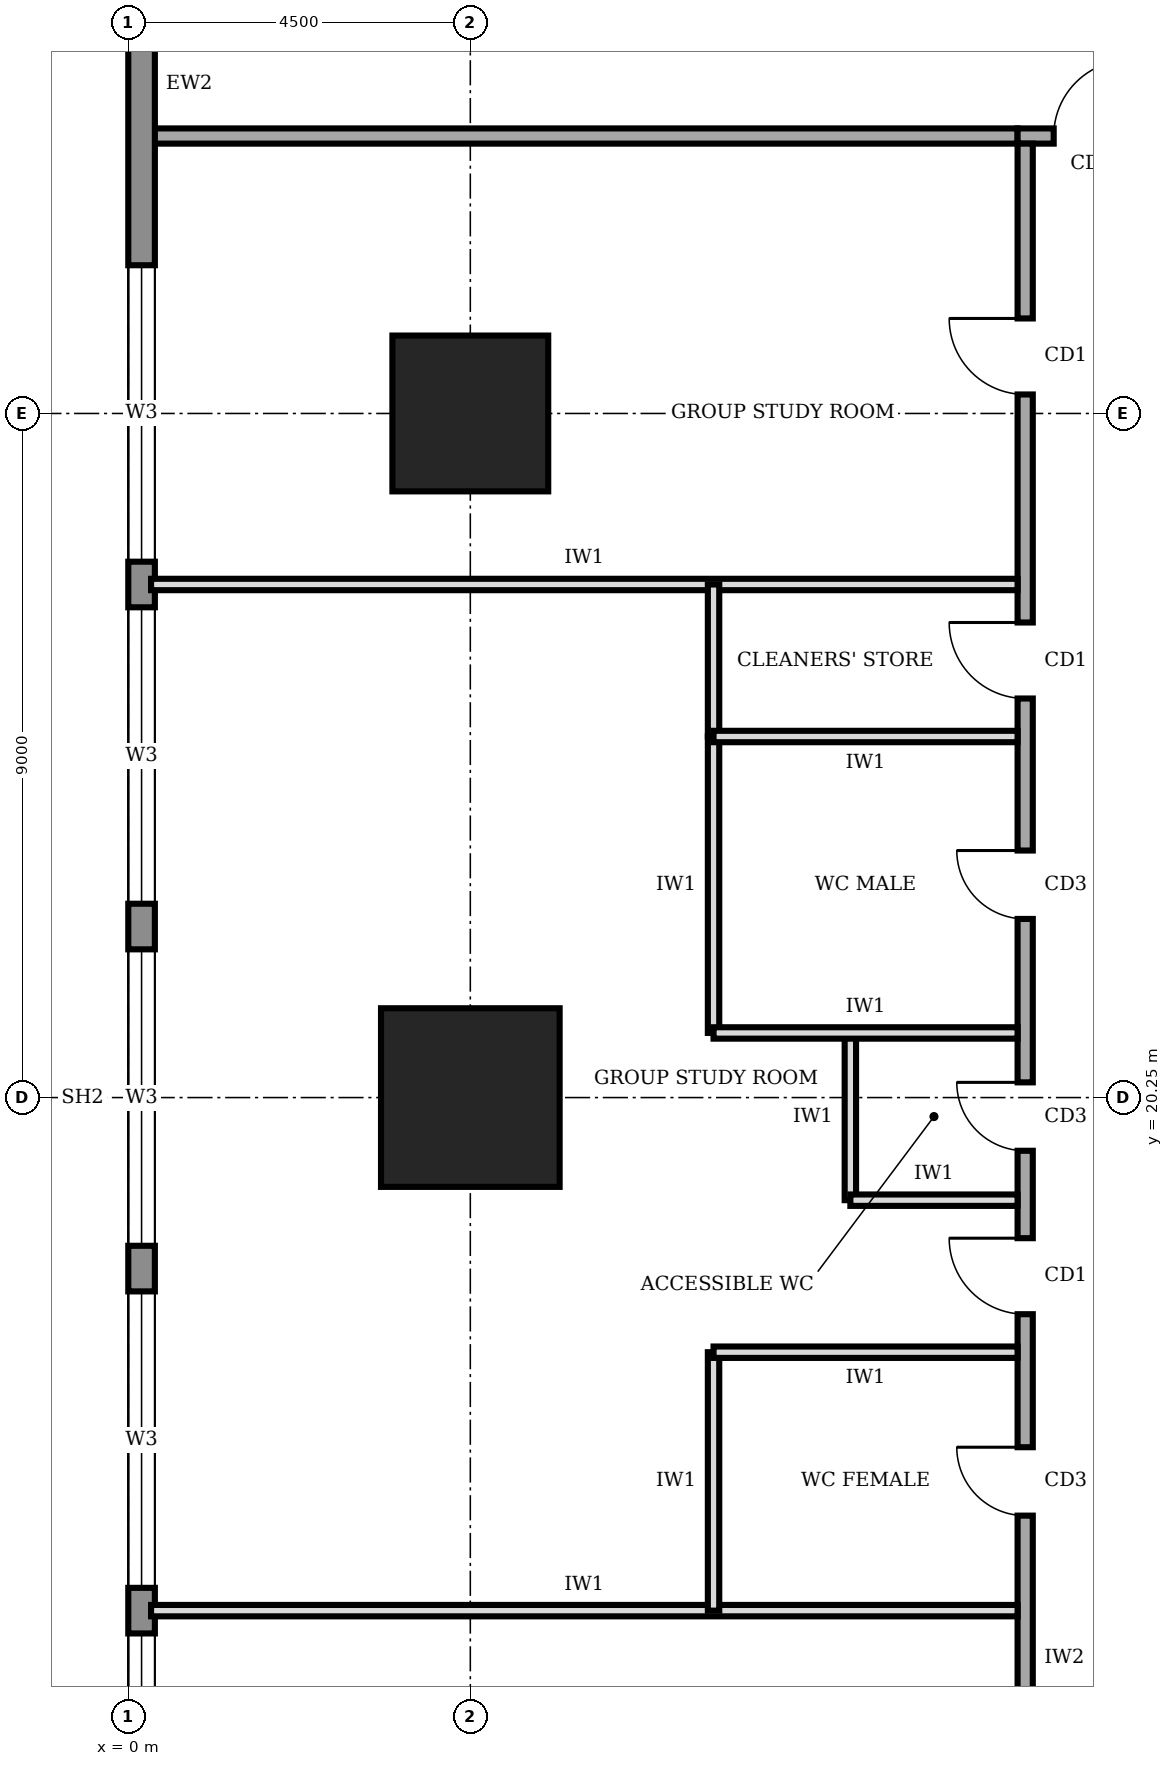
"""IFC4 building model, lengths in metres.
Left out: names, types, materials, properties, quantities, classifications, styles, units other than length and angle.
Written with IfcOpenShell. Run it as: python <this file> out.ifc"""

import sys

from ifc_helpers import new_model, si_unit, direction, frame, frame_2d, origin, origin_2d, place, context, subcontext, project, spatial, rectangle, extrude, element, fill, save


model = new_model("IFC4")
c1 = context("Model", 3, precision=1e-05, world=origin(), true_north=direction((0.0, 1.0)))
c2 = subcontext(c1, "Body", "Model", "MODEL_VIEW")
j1 = project(units=[si_unit("LENGTHUNIT", "METRE"), si_unit("PLANEANGLEUNIT", "RADIAN")], contexts=[c1])
p1 = place(None, origin())
s1 = spatial("IfcSite", under=j1, at=p1, CompositionType="ELEMENT")
p2 = place(p1, origin())
s2 = spatial("IfcBuilding", under=s1, at=p2, CompositionType="ELEMENT")
p3 = place(p2, frame((0.0, 0.0, 189.0)))
s3 = spatial("IfcBuildingStorey", under=s2, at=p3, CompositionType="ELEMENT", Elevation=189.0)
p4 = place(p3, frame((4.5, 20.25, 0.0), z_axis=(0.0, 0.0, 1.0), x_axis=(1.0, 0.0, 0.0)))
e1 = element("IfcColumn", 1, at=p4, inside=s3, PredefinedType="COLUMN", context=c2, shape_type="SweptSolid", body=[
    extrude(rectangle(XDim=2.35, YDim=2.35, at=origin_2d()), origin(), (0.0, 0.0, 1.0), 4.0),
])
p5 = place(p3, frame((4.5, 29.25, 0.0), z_axis=(0.0, 0.0, 1.0), x_axis=(1.0, 0.0, 0.0)))
e2 = element("IfcColumn", 2, at=p5, inside=s3, PredefinedType="COLUMN", context=c2, shape_type="SweptSolid", body=[
    extrude(rectangle(XDim=2.05, YDim=2.05, at=origin_2d()), origin(), (0.0, 0.0, 1.0), 4.0),
])
p6 = place(p3, frame((0.175, 35.98, 0.0), z_axis=(0.0, 0.0, 1.0), x_axis=(0.0, -1.0, 0.0)))
e3 = element("IfcWall", 3, at=p6, inside=s3, PredefinedType="STANDARD", context=c2, shape_type="SweptSolid", body=[
    extrude(rectangle(XDim=31.46, YDim=0.35, at=frame_2d((15.73, 0.0))), origin(), (0.0, 0.0, 1.0), 3.75),
])
p7 = place(p6, frame((27.21, 0.0, 0.95)))
e4 = element("IfcOpeningElement", 4, at=p7, cuts=e3, PredefinedType="OPENING", context=c2, shape_type="SweptSolid", body=[
    extrude(rectangle(XDim=3.9, YDim=1.8, at=frame_2d((1.95, 0.9))), frame((0.0, 0.185, 0.0), z_axis=(0.0, -1.0, 0.0), x_axis=(1.0, 0.0, 0.0)), (0.0, 0.0, 1.0), 0.37),
])
p8 = place(p6, frame((22.78, 0.0, 0.95)))
e5 = element("IfcOpeningElement", 5, at=p8, cuts=e3, PredefinedType="OPENING", context=c2, shape_type="SweptSolid", body=[
    extrude(rectangle(XDim=3.9, YDim=1.8, at=frame_2d((1.95, 0.9))), frame((0.0, 0.185, 0.0), z_axis=(0.0, -1.0, 0.0), x_axis=(1.0, 0.0, 0.0)), (0.0, 0.0, 1.0), 0.37),
])
p9 = place(p6, frame((18.28, 0.0, 0.95)))
e6 = element("IfcOpeningElement", 6, at=p9, cuts=e3, PredefinedType="OPENING", context=c2, shape_type="SweptSolid", body=[
    extrude(rectangle(XDim=3.9, YDim=1.8, at=frame_2d((1.95, 0.9))), frame((0.0, 0.185, 0.0), z_axis=(0.0, -1.0, 0.0), x_axis=(1.0, 0.0, 0.0)), (0.0, 0.0, 1.0), 0.37),
])
p10 = place(p6, frame((13.78, 0.0, 0.95)))
e7 = element("IfcOpeningElement", 7, at=p10, cuts=e3, PredefinedType="OPENING", context=c2, shape_type="SweptSolid", body=[
    extrude(rectangle(XDim=3.9, YDim=1.8, at=frame_2d((1.95, 0.9))), frame((0.0, 0.185, 0.0), z_axis=(0.0, -1.0, 0.0), x_axis=(1.0, 0.0, 0.0)), (0.0, 0.0, 1.0), 0.37),
])
p11 = place(p6, frame((9.28, 0.0, 0.95)))
e8 = element("IfcOpeningElement", 8, at=p11, cuts=e3, PredefinedType="OPENING", context=c2, shape_type="SweptSolid", body=[
    extrude(rectangle(XDim=3.9, YDim=1.8, at=frame_2d((1.95, 0.9))), frame((0.0, 0.185, 0.0), z_axis=(0.0, -1.0, 0.0), x_axis=(1.0, 0.0, 0.0)), (0.0, 0.0, 1.0), 0.37),
])
p12 = place(p6, frame((4.78, 0.0, 0.95)))
e9 = element("IfcOpeningElement", 9, at=p12, cuts=e3, PredefinedType="OPENING", context=c2, shape_type="SweptSolid", body=[
    extrude(rectangle(XDim=3.9, YDim=1.8, at=frame_2d((1.95, 0.9))), frame((0.0, 0.185, 0.0), z_axis=(0.0, -1.0, 0.0), x_axis=(1.0, 0.0, 0.0)), (0.0, 0.0, 1.0), 0.37),
])
p13 = place(p3, frame((28.6, 32.9, 0.0), z_axis=(0.0, 0.0, 1.0), x_axis=(-1.0, 0.0, 0.0)))
e10 = element("IfcWall", 10, at=p13, inside=s3, PredefinedType="SOLIDWALL", context=c2, shape_type="SweptSolid", body=[
    extrude(rectangle(XDim=16.9, YDim=0.2, at=frame_2d((8.45, 0.0))), origin(), (0.0, 0.0, 1.0), 3.75),
])
p14 = place(p13, frame((15.425, 0.0, 0.0)))
e11 = element("IfcOpeningElement", 11, at=p14, cuts=e10, PredefinedType="OPENING", context=c2, shape_type="SweptSolid", body=[
    extrude(rectangle(XDim=1.0, YDim=2.1, at=frame_2d((0.5, 1.05))), frame((0.0, 0.11, 0.0), z_axis=(0.0, -1.0, 0.0), x_axis=(1.0, 0.0, 0.0)), (0.0, 0.0, 1.0), 0.22),
])
p15 = place(p13, frame((12.35, 0.0, 0.0)))
e12 = element("IfcOpeningElement", 12, at=p15, cuts=e10, PredefinedType="OPENING", context=c2, shape_type="SweptSolid", body=[
    extrude(rectangle(XDim=1.0, YDim=2.1, at=frame_2d((0.5, 1.05))), frame((0.0, 0.11, 0.0), z_axis=(0.0, -1.0, 0.0), x_axis=(1.0, 0.0, 0.0)), (0.0, 0.0, 1.0), 0.22),
])
p16 = place(p13, frame((5.6, 0.0, 0.0)))
e13 = element("IfcOpeningElement", 13, at=p16, cuts=e10, PredefinedType="OPENING", context=c2, shape_type="SweptSolid", body=[
    extrude(rectangle(XDim=1.0, YDim=2.1, at=frame_2d((0.5, 1.05))), frame((0.0, 0.11, 0.0), z_axis=(0.0, -1.0, 0.0), x_axis=(1.0, 0.0, 0.0)), (0.0, 0.0, 1.0), 0.22),
])
p17 = place(p13, frame((0.275, 0.0, 0.0)))
e14 = element("IfcOpeningElement", 14, at=p17, cuts=e10, PredefinedType="OPENING", context=c2, shape_type="SweptSolid", body=[
    extrude(rectangle(XDim=1.0, YDim=2.1, at=frame_2d((0.5, 1.05))), frame((0.0, 0.11, 0.0), z_axis=(0.0, -1.0, 0.0), x_axis=(1.0, 0.0, 0.0)), (0.0, 0.0, 1.0), 0.22),
])
p18 = place(p3, frame((11.8, 32.8, 0.0), z_axis=(0.0, 0.0, 1.0), x_axis=(0.0, -1.0, 0.0)))
e15 = element("IfcWall", 15, at=p18, inside=s3, PredefinedType="SOLIDWALL", context=c2, shape_type="SweptSolid", body=[
    extrude(rectangle(XDim=25.3, YDim=0.2, at=frame_2d((12.65, 0.0))), origin(), (0.0, 0.0, 1.0), 3.75),
])
p19 = place(p18, frame((21.8, 0.0, 0.0)))
e16 = element("IfcOpeningElement", 16, at=p19, cuts=e15, PredefinedType="OPENING", context=c2, shape_type="SweptSolid", body=[
    extrude(rectangle(XDim=1.0, YDim=2.1, at=frame_2d((0.5, 1.05))), frame((0.0, 0.11, 0.0), z_axis=(0.0, -1.0, 0.0), x_axis=(1.0, 0.0, 0.0)), (0.0, 0.0, 1.0), 0.22),
])
p20 = place(p18, frame((17.15, 0.0, 0.0)))
e17 = element("IfcOpeningElement", 17, at=p20, cuts=e15, PredefinedType="OPENING", context=c2, shape_type="SweptSolid", body=[
    extrude(rectangle(XDim=0.9, YDim=2.1, at=frame_2d((0.45, 1.05))), frame((0.0, 0.11, 0.0), z_axis=(0.0, -1.0, 0.0), x_axis=(1.0, 0.0, 0.0)), (0.0, 0.0, 1.0), 0.22),
])
p21 = place(p18, frame((12.35, 0.0, 0.0)))
e18 = element("IfcOpeningElement", 18, at=p21, cuts=e15, PredefinedType="OPENING", context=c2, shape_type="SweptSolid", body=[
    extrude(rectangle(XDim=0.9, YDim=2.1, at=frame_2d((0.45, 1.05))), frame((0.0, 0.11, 0.0), z_axis=(0.0, -1.0, 0.0), x_axis=(1.0, 0.0, 0.0)), (0.0, 0.0, 1.0), 0.22),
])
p22 = place(p18, frame((9.3, 0.0, 0.0)))
e19 = element("IfcOpeningElement", 19, at=p22, cuts=e15, PredefinedType="OPENING", context=c2, shape_type="SweptSolid", body=[
    extrude(rectangle(XDim=0.9, YDim=2.1, at=frame_2d((0.45, 1.05))), frame((0.0, 0.11, 0.0), z_axis=(0.0, -1.0, 0.0), x_axis=(1.0, 0.0, 0.0)), (0.0, 0.0, 1.0), 0.22),
])
p23 = place(p18, frame((6.3, 0.0, 0.0)))
e20 = element("IfcOpeningElement", 20, at=p23, cuts=e15, PredefinedType="OPENING", context=c2, shape_type="SweptSolid", body=[
    extrude(rectangle(XDim=1.0, YDim=2.1, at=frame_2d((0.5, 1.05))), frame((0.0, 0.11, 0.0), z_axis=(0.0, -1.0, 0.0), x_axis=(1.0, 0.0, 0.0)), (0.0, 0.0, 1.0), 0.22),
])
p24 = place(p18, frame((14.4, 0.0, 0.0)))
e21 = element("IfcOpeningElement", 21, at=p24, cuts=e15, PredefinedType="OPENING", context=c2, shape_type="SweptSolid", body=[
    extrude(rectangle(XDim=1.0, YDim=2.1, at=frame_2d((0.5, 1.05))), frame((0.0, 0.11, 0.0), z_axis=(0.0, -1.0, 0.0), x_axis=(1.0, 0.0, 0.0)), (0.0, 0.0, 1.0), 0.22),
])
p25 = place(p18, frame((2.3, 0.0, 0.0)))
e22 = element("IfcOpeningElement", 22, at=p25, cuts=e15, PredefinedType="OPENING", context=c2, shape_type="SweptSolid", body=[
    extrude(rectangle(XDim=1.0, YDim=2.1, at=frame_2d((0.5, 1.05))), frame((0.0, 0.11, 0.0), z_axis=(0.0, -1.0, 0.0), x_axis=(1.0, 0.0, 0.0)), (0.0, 0.0, 1.0), 0.22),
])
p26 = place(p3, frame((0.3, 32.9, 0.0), z_axis=(0.0, 0.0, 1.0), x_axis=(1.0, 0.0, 0.0)))
e23 = element("IfcWall", 23, at=p26, inside=s3, PredefinedType="SOLIDWALL", context=c2, shape_type="SweptSolid", body=[
    extrude(rectangle(XDim=11.4, YDim=0.2, at=frame_2d((5.7, 0.0))), origin(), (0.0, 0.0, 1.0), 3.75),
])
for number, where, z_axis, x_axis in (
    (24, (0.3, 13.5, 0.0), (0.0, 0.0, 1.0), (1.0, 0.0, 0.0)),
    (25, (0.3, 27.0, 0.0), (0.0, 0.0, 1.0), (1.0, 0.0, 0.0)),
):
    element("IfcWall", number, at=place(p3, frame(where, z_axis=z_axis, x_axis=x_axis)), inside=s3, PredefinedType="PARTITIONING", context=c2, shape_type="SweptSolid", body=[
        extrude(rectangle(XDim=11.4, YDim=0.15, at=frame_2d((5.7, 0.0))), origin(), (0.0, 0.0, 1.0), 3.75),
    ])
p27 = place(p3, frame((11.7, 16.9, 0.0), z_axis=(0.0, 0.0, 1.0), x_axis=(-1.0, 0.0, 0.0)))
e26 = element("IfcWall", 26, at=p27, inside=s3, PredefinedType="PARTITIONING", context=c2, shape_type="SweptSolid", body=[
    extrude(rectangle(XDim=4.0, YDim=0.15, at=frame_2d((2.0, 0.0))), origin(), (0.0, 0.0, 1.0), 3.75),
])
p28 = place(p3, frame((11.7, 18.9, 0.0), z_axis=(0.0, 0.0, 1.0), x_axis=(-1.0, 0.0, 0.0)))
e27 = element("IfcWall", 27, at=p28, inside=s3, PredefinedType="PARTITIONING", context=c2, shape_type="SweptSolid", body=[
    extrude(rectangle(XDim=2.2, YDim=0.15, at=frame_2d((1.1, 0.0))), origin(), (0.0, 0.0, 1.0), 3.75),
])
p29 = place(p3, frame((11.7, 21.1, 0.0), z_axis=(0.0, 0.0, 1.0), x_axis=(-1.0, 0.0, 0.0)))
e28 = element("IfcWall", 28, at=p29, inside=s3, PredefinedType="PARTITIONING", context=c2, shape_type="SweptSolid", body=[
    extrude(rectangle(XDim=4.0, YDim=0.15, at=frame_2d((2.0, 0.0))), origin(), (0.0, 0.0, 1.0), 2.85),
])
p30 = place(p3, frame((11.7, 25.0, 0.0), z_axis=(0.0, 0.0, 1.0), x_axis=(-1.0, 0.0, 0.0)))
e29 = element("IfcWall", 29, at=p30, inside=s3, PredefinedType="PARTITIONING", context=c2, shape_type="SweptSolid", body=[
    extrude(rectangle(XDim=4.0, YDim=0.15, at=frame_2d((2.0, 0.0))), origin(), (0.0, 0.0, 1.0), 3.75),
])
p31 = place(p3, frame((7.7, 13.5, 0.0), z_axis=(0.0, 0.0, 1.0), x_axis=(0.0, 1.0, 0.0)))
e30 = element("IfcWall", 30, at=p31, inside=s3, PredefinedType="PARTITIONING", context=c2, shape_type="SweptSolid", body=[
    extrude(rectangle(XDim=3.4, YDim=0.15, at=frame_2d((1.7, 0.0))), origin(), (0.0, 0.0, 1.0), 3.75),
])
p32 = place(p3, frame((9.5, 18.9, 0.0), z_axis=(0.0, 0.0, 1.0), x_axis=(0.0, 1.0, 0.0)))
e31 = element("IfcWall", 31, at=p32, inside=s3, PredefinedType="PARTITIONING", context=c2, shape_type="SweptSolid", body=[
    extrude(rectangle(XDim=2.2, YDim=0.15, at=frame_2d((1.1, 0.0))), origin(), (0.0, 0.0, 1.0), 3.75),
])
p33 = place(p3, frame((7.7, 21.1, 0.0), z_axis=(0.0, 0.0, 1.0), x_axis=(0.0, 1.0, 0.0)))
e32 = element("IfcWall", 32, at=p33, inside=s3, PredefinedType="PARTITIONING", context=c2, shape_type="SweptSolid", body=[
    extrude(rectangle(XDim=3.9, YDim=0.15, at=frame_2d((1.95, 0.0))), origin(), (0.0, 0.0, 1.0), 3.75),
])
p34 = place(p3, frame((7.7, 25.0, 0.0), z_axis=(0.0, 0.0, 1.0), x_axis=(0.0, 1.0, 0.0)))
e33 = element("IfcWall", 33, at=p34, inside=s3, PredefinedType="PARTITIONING", context=c2, shape_type="SweptSolid", body=[
    extrude(rectangle(XDim=2.0, YDim=0.15, at=frame_2d((1.0, 0.0))), origin(), (0.0, 0.0, 1.0), 3.75),
])
p35 = place(p8, origin())
e34 = element("IfcWindow", 34, at=p35, inside=s3, PartitioningType="SINGLE_PANEL", PredefinedType="WINDOW", context=c2, shape_type="SweptSolid", body=[
    extrude(rectangle(XDim=3.9, YDim=1.8, at=frame_2d((1.95, 0.9))), frame((0.0, 0.03, 0.0), z_axis=(0.0, -1.0, 0.0), x_axis=(1.0, 0.0, 0.0)), (0.0, 0.0, 1.0), 0.06),
])
fill(e5, e34)
p36 = place(p9, origin())
e35 = element("IfcWindow", 35, at=p36, inside=s3, PartitioningType="SINGLE_PANEL", PredefinedType="WINDOW", context=c2, shape_type="SweptSolid", body=[
    extrude(rectangle(XDim=3.9, YDim=1.8, at=frame_2d((1.95, 0.9))), frame((0.0, 0.03, 0.0), z_axis=(0.0, -1.0, 0.0), x_axis=(1.0, 0.0, 0.0)), (0.0, 0.0, 1.0), 0.06),
])
fill(e6, e35)
p37 = place(p10, origin())
e36 = element("IfcWindow", 36, at=p37, inside=s3, PartitioningType="SINGLE_PANEL", PredefinedType="WINDOW", context=c2, shape_type="SweptSolid", body=[
    extrude(rectangle(XDim=3.9, YDim=1.8, at=frame_2d((1.95, 0.9))), frame((0.0, 0.03, 0.0), z_axis=(0.0, -1.0, 0.0), x_axis=(1.0, 0.0, 0.0)), (0.0, 0.0, 1.0), 0.06),
])
fill(e7, e36)
p38 = place(p11, origin())
e37 = element("IfcWindow", 37, at=p38, inside=s3, PartitioningType="SINGLE_PANEL", PredefinedType="WINDOW", context=c2, shape_type="SweptSolid", body=[
    extrude(rectangle(XDim=3.9, YDim=1.8, at=frame_2d((1.95, 0.9))), frame((0.0, 0.03, 0.0), z_axis=(0.0, -1.0, 0.0), x_axis=(1.0, 0.0, 0.0)), (0.0, 0.0, 1.0), 0.06),
])
fill(e8, e37)
p39 = place(p12, origin())
e38 = element("IfcWindow", 38, at=p39, inside=s3, PartitioningType="SINGLE_PANEL", PredefinedType="WINDOW", context=c2, shape_type="SweptSolid", body=[
    extrude(rectangle(XDim=3.9, YDim=1.8, at=frame_2d((1.95, 0.9))), frame((0.0, 0.03, 0.0), z_axis=(0.0, -1.0, 0.0), x_axis=(1.0, 0.0, 0.0)), (0.0, 0.0, 1.0), 0.06),
])
fill(e9, e38)
p40 = place(p14, frame((1.0, 0.0, 0.0), z_axis=(0.0, 0.0, 1.0), x_axis=(-1.0, 0.0, 0.0)))
e39 = element("IfcDoor", 39, at=p40, inside=s3, OperationType="SINGLE_SWING_RIGHT", PredefinedType="DOOR", context=c2, shape_type="SweptSolid", body=[
    extrude(rectangle(XDim=1.0, YDim=2.1, at=frame_2d((0.5, 1.05))), frame((0.0, 0.025, 0.0), z_axis=(0.0, -1.0, 0.0), x_axis=(1.0, 0.0, 0.0)), (0.0, 0.0, 1.0), 0.05),
])
fill(e11, e39)
p41 = place(p20, frame((0.9, 0.0, 0.0), z_axis=(0.0, 0.0, 1.0), x_axis=(-1.0, 0.0, 0.0)))
e40 = element("IfcDoor", 40, at=p41, inside=s3, OperationType="SINGLE_SWING_RIGHT", PredefinedType="DOOR", context=c2, shape_type="SweptSolid", body=[
    extrude(rectangle(XDim=0.9, YDim=2.1, at=frame_2d((0.45, 1.05))), frame((0.0, 0.025, 0.0), z_axis=(0.0, -1.0, 0.0), x_axis=(1.0, 0.0, 0.0)), (0.0, 0.0, 1.0), 0.05),
])
fill(e17, e40)
p42 = place(p21, frame((0.9, 0.0, 0.0), z_axis=(0.0, 0.0, 1.0), x_axis=(-1.0, 0.0, 0.0)))
e41 = element("IfcDoor", 41, at=p42, inside=s3, OperationType="SINGLE_SWING_RIGHT", PredefinedType="DOOR", context=c2, shape_type="SweptSolid", body=[
    extrude(rectangle(XDim=0.9, YDim=2.1, at=frame_2d((0.45, 1.05))), frame((0.0, 0.025, 0.0), z_axis=(0.0, -1.0, 0.0), x_axis=(1.0, 0.0, 0.0)), (0.0, 0.0, 1.0), 0.05),
])
fill(e18, e41)
p43 = place(p22, frame((0.9, 0.0, 0.0), z_axis=(0.0, 0.0, 1.0), x_axis=(-1.0, 0.0, 0.0)))
e42 = element("IfcDoor", 42, at=p43, inside=s3, OperationType="SINGLE_SWING_RIGHT", PredefinedType="DOOR", context=c2, shape_type="SweptSolid", body=[
    extrude(rectangle(XDim=0.9, YDim=2.1, at=frame_2d((0.45, 1.05))), frame((0.0, 0.025, 0.0), z_axis=(0.0, -1.0, 0.0), x_axis=(1.0, 0.0, 0.0)), (0.0, 0.0, 1.0), 0.05),
])
fill(e19, e42)
p44 = place(p23, frame((1.0, 0.0, 0.0), z_axis=(0.0, 0.0, 1.0), x_axis=(-1.0, 0.0, 0.0)))
e43 = element("IfcDoor", 43, at=p44, inside=s3, OperationType="SINGLE_SWING_RIGHT", PredefinedType="DOOR", context=c2, shape_type="SweptSolid", body=[
    extrude(rectangle(XDim=1.0, YDim=2.1, at=frame_2d((0.5, 1.05))), frame((0.0, 0.025, 0.0), z_axis=(0.0, -1.0, 0.0), x_axis=(1.0, 0.0, 0.0)), (0.0, 0.0, 1.0), 0.05),
])
fill(e20, e43)
p45 = place(p24, frame((1.0, 0.0, 0.0), z_axis=(0.0, 0.0, 1.0), x_axis=(-1.0, 0.0, 0.0)))
e44 = element("IfcDoor", 44, at=p45, inside=s3, OperationType="SINGLE_SWING_RIGHT", PredefinedType="DOOR", context=c2, shape_type="SweptSolid", body=[
    extrude(rectangle(XDim=1.0, YDim=2.1, at=frame_2d((0.5, 1.05))), frame((0.0, 0.025, 0.0), z_axis=(0.0, -1.0, 0.0), x_axis=(1.0, 0.0, 0.0)), (0.0, 0.0, 1.0), 0.05),
])
fill(e21, e44)
p46 = place(p25, frame((1.0, 0.0, 0.0), z_axis=(0.0, 0.0, 1.0), x_axis=(-1.0, 0.0, 0.0)))
e45 = element("IfcDoor", 45, at=p46, inside=s3, OperationType="SINGLE_SWING_RIGHT", PredefinedType="DOOR", context=c2, shape_type="SweptSolid", body=[
    extrude(rectangle(XDim=1.0, YDim=2.1, at=frame_2d((0.5, 1.05))), frame((0.0, 0.025, 0.0), z_axis=(0.0, -1.0, 0.0), x_axis=(1.0, 0.0, 0.0)), (0.0, 0.0, 1.0), 0.05),
])
fill(e22, e45)
save(model, sys.argv[1])
